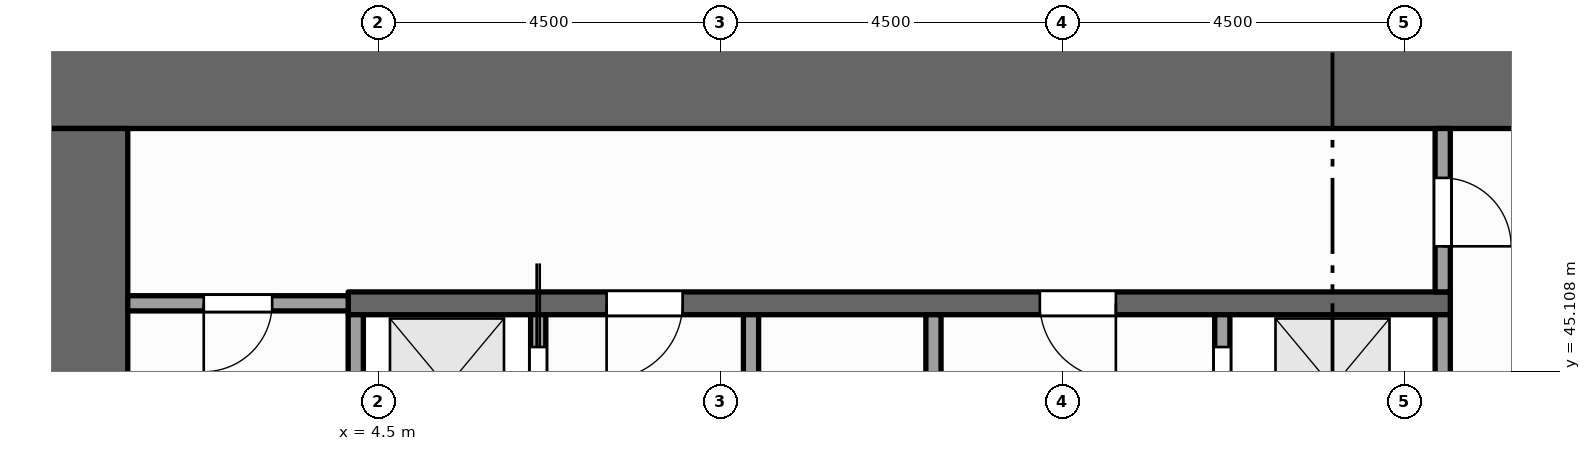
"""IFC4 building model, lengths in metres.
Left out: names, types, materials, properties, quantities, classifications, styles, units other than length and angle.
Written with IfcOpenShell. Run it as: python <this file> out.ifc"""

import sys

from ifc_helpers import new_model, si_unit, direction, frame, frame_2d, origin, place, context, subcontext, project, spatial, rectangle, extrude, element, fill, save


model = new_model("IFC4")
c1 = context("Model", 3, precision=1e-05, world=origin(), true_north=direction((0.0, 1.0)))
c2 = subcontext(c1, "Body", "Model", "MODEL_VIEW")
j1 = project(units=[si_unit("LENGTHUNIT", "METRE"), si_unit("PLANEANGLEUNIT", "RADIAN")], contexts=[c1])
p1 = place(None, origin())
s1 = spatial("IfcSite", under=j1, at=p1, CompositionType="ELEMENT")
p2 = place(p1, origin())
s2 = spatial("IfcBuilding", under=s1, at=p2, CompositionType="ELEMENT")
p3 = place(p2, frame((0.0, 0.0, 8.0)))
s3 = spatial("IfcBuildingStorey", under=s2, at=p3, CompositionType="ELEMENT", Elevation=8.0)
p4 = place(p3, frame((0.0, 48.9, -0.15), z_axis=(0.0, 0.0, 1.0), x_axis=(1.0, 0.0, 0.0)))
e1 = element("IfcWall", 1, at=p4, inside=s3, PredefinedType="SHEAR", context=c2, shape_type="SweptSolid", body=[
    extrude(rectangle(XDim=22.5, YDim=1.2, at=frame_2d((11.25, 0.0))), origin(), (0.0, 0.0, 1.0), 6.0),
])
p5 = place(p3, frame((0.6, 37.2, -0.15), z_axis=(0.0, 0.0, 1.0), x_axis=(0.0, 1.0, 0.0)))
e2 = element("IfcWall", 2, at=p5, inside=s3, PredefinedType="SHEAR", context=c2, shape_type="SweptSolid", body=[
    extrude(rectangle(XDim=11.1, YDim=1.2, at=frame_2d((5.55, 0.0))), origin(), (0.0, 0.0, 1.0), 6.0),
])
p6 = place(p3, frame((4.2, 43.525, 0.0), z_axis=(0.0, 0.0, 1.0), x_axis=(0.0, 1.0, 0.0)))
e3 = element("IfcWall", 3, at=p6, inside=s3, PredefinedType="SOLIDWALL", context=c2, shape_type="SweptSolid", body=[
    extrude(rectangle(XDim=2.325, YDim=0.2, at=frame_2d((1.163, 0.0))), origin(), (0.0, 0.0, 1.0), 5.75),
])
p7 = place(p3, frame((6.6, 37.2, 0.0), z_axis=(0.0, 0.0, 1.0), x_axis=(0.0, 1.0, 0.0)))
e4 = element("IfcWall", 4, at=p7, inside=s3, PredefinedType="SOLIDWALL", context=c2, shape_type="SweptSolid", body=[
    extrude(rectangle(XDim=8.65, YDim=0.2, at=frame_2d((4.325, 0.0))), origin(), (0.0, 0.0, 1.0), 5.75),
])
p8 = place(p7, frame((0.5, 0.0, 0.012)))
e5 = element("IfcOpeningElement", 5, at=p8, cuts=e4, PredefinedType="OPENING", context=c2, shape_type="SweptSolid", body=[
    extrude(rectangle(XDim=1.1, YDim=2.1, at=frame_2d((0.55, 1.05))), frame((0.0, 0.11, 0.0), z_axis=(0.0, -1.0, 0.0), x_axis=(1.0, 0.0, 0.0)), (0.0, 0.0, 1.0), 0.22),
])
p9 = place(p7, frame((2.75, 0.0, 0.012)))
e6 = element("IfcOpeningElement", 6, at=p9, cuts=e4, PredefinedType="OPENING", context=c2, shape_type="SweptSolid", body=[
    extrude(rectangle(XDim=1.1, YDim=2.1, at=frame_2d((0.55, 1.05))), frame((0.0, 0.11, 0.0), z_axis=(0.0, -1.0, 0.0), x_axis=(1.0, 0.0, 0.0)), (0.0, 0.0, 1.0), 0.22),
])
p10 = place(p7, frame((4.95, 0.0, 0.012)))
e7 = element("IfcOpeningElement", 7, at=p10, cuts=e4, PredefinedType="OPENING", context=c2, shape_type="SweptSolid", body=[
    extrude(rectangle(XDim=1.1, YDim=2.1, at=frame_2d((0.55, 1.05))), frame((0.0, 0.11, 0.0), z_axis=(0.0, -1.0, 0.0), x_axis=(1.0, 0.0, 0.0)), (0.0, 0.0, 1.0), 0.22),
])
p11 = place(p7, frame((7.125, 0.0, 0.012)))
e8 = element("IfcOpeningElement", 8, at=p11, cuts=e4, PredefinedType="OPENING", context=c2, shape_type="SweptSolid", body=[
    extrude(rectangle(XDim=1.1, YDim=2.1, at=frame_2d((0.55, 1.05))), frame((0.0, 0.11, 0.0), z_axis=(0.0, -1.0, 0.0), x_axis=(1.0, 0.0, 0.0)), (0.0, 0.0, 1.0), 0.22),
])
p12 = place(p3, frame((9.4, 37.2, 0.0), z_axis=(0.0, 0.0, 1.0), x_axis=(0.0, 1.0, 0.0)))
e9 = element("IfcWall", 9, at=p12, inside=s3, PredefinedType="PARTITIONING", context=c2, shape_type="SweptSolid", body=[
    extrude(rectangle(XDim=8.65, YDim=0.2, at=frame_2d((4.325, 0.0))), origin(), (0.0, 0.0, 1.0), 5.75),
])
p13 = place(p12, frame((3.875, 0.0, 0.0)))
e10 = element("IfcOpeningElement", 10, at=p13, cuts=e9, PredefinedType="OPENING", context=c2, shape_type="SweptSolid", body=[
    extrude(rectangle(XDim=0.9, YDim=2.1, at=frame_2d((0.45, 1.05))), frame((0.0, 0.11, 0.0), z_axis=(0.0, -1.0, 0.0), x_axis=(1.0, 0.0, 0.0)), (0.0, 0.0, 1.0), 0.22),
])
p14 = place(p3, frame((11.8, 37.2, 0.0), z_axis=(0.0, 0.0, 1.0), x_axis=(0.0, 1.0, 0.0)))
e11 = element("IfcWall", 11, at=p14, inside=s3, PredefinedType="PARTITIONING", context=c2, shape_type="SweptSolid", body=[
    extrude(rectangle(XDim=8.65, YDim=0.2, at=frame_2d((4.325, 0.0))), origin(), (0.0, 0.0, 1.0), 5.75),
])
p15 = place(p3, frame((15.6, 43.7, 0.0), z_axis=(0.0, 0.0, 1.0), x_axis=(0.0, 1.0, 0.0)))
e12 = element("IfcWall", 12, at=p15, inside=s3, PredefinedType="SOLIDWALL", context=c2, shape_type="SweptSolid", body=[
    extrude(rectangle(XDim=2.15, YDim=0.2, at=frame_2d((1.075, 0.0))), origin(), (0.0, 0.0, 1.0), 5.75),
])
p16 = place(p15, frame((0.625, 0.0, 0.012)))
e13 = element("IfcOpeningElement", 13, at=p16, cuts=e12, PredefinedType="OPENING", context=c2, shape_type="SweptSolid", body=[
    extrude(rectangle(XDim=1.1, YDim=2.1, at=frame_2d((0.55, 1.05))), frame((0.0, 0.11, 0.0), z_axis=(0.0, -1.0, 0.0), x_axis=(1.0, 0.0, 0.0)), (0.0, 0.0, 1.0), 0.22),
])
p17 = place(p3, frame((18.5, 43.7, 0.0), z_axis=(0.0, 0.0, 1.0), x_axis=(0.0, 1.0, 0.0)))
e14 = element("IfcWall", 14, at=p17, inside=s3, PredefinedType="SOLIDWALL", context=c2, shape_type="SweptSolid", body=[
    extrude(rectangle(XDim=2.15, YDim=0.2, at=frame_2d((1.075, 0.0))), origin(), (0.0, 0.0, 1.0), 5.75),
])
p18 = place(p3, frame((18.5, 46.15, 0.0), z_axis=(0.0, 0.0, 1.0), x_axis=(0.0, 1.0, 0.0)))
e15 = element("IfcWall", 15, at=p18, inside=s3, PredefinedType="PARTITIONING", context=c2, shape_type="SweptSolid", body=[
    extrude(rectangle(XDim=2.15, YDim=0.2, at=frame_2d((1.075, 0.0))), origin(), (0.0, 0.0, 1.0), 5.75),
])
p19 = place(p18, frame((0.6, 0.0, 0.0)))
e16 = element("IfcOpeningElement", 16, at=p19, cuts=e15, PredefinedType="OPENING", context=c2, shape_type="SweptSolid", body=[
    extrude(rectangle(XDim=0.9, YDim=2.1, at=frame_2d((0.45, 1.05))), frame((0.0, 0.11, 0.0), z_axis=(0.0, -1.0, 0.0), x_axis=(1.0, 0.0, 0.0)), (0.0, 0.0, 1.0), 0.22),
])
p20 = place(p3, frame((1.2, 46.0, 0.0), z_axis=(0.0, 0.0, 1.0), x_axis=(1.0, 0.0, 0.0)))
e17 = element("IfcWall", 17, at=p20, inside=s3, PredefinedType="PARTITIONING", context=c2, shape_type="SweptSolid", body=[
    extrude(rectangle(XDim=2.9, YDim=0.2, at=frame_2d((1.45, 0.0))), origin(), (0.0, 0.0, 1.0), 5.75),
])
p21 = place(p20, frame((1.0, 0.0, 0.0)))
e18 = element("IfcOpeningElement", 18, at=p21, cuts=e17, PredefinedType="OPENING", context=c2, shape_type="SweptSolid", body=[
    extrude(rectangle(XDim=0.9, YDim=2.1, at=frame_2d((0.45, 1.05))), frame((0.0, 0.11, 0.0), z_axis=(0.0, -1.0, 0.0), x_axis=(1.0, 0.0, 0.0)), (0.0, 0.0, 1.0), 0.22),
])
p22 = place(p3, frame((4.1, 46.0, 0.0), z_axis=(0.0, 0.0, 1.0), x_axis=(1.0, 0.0, 0.0)))
e19 = element("IfcWall", 19, at=p22, inside=s3, PredefinedType="SHEAR", context=c2, shape_type="SweptSolid", body=[
    extrude(rectangle(XDim=14.5, YDim=0.3, at=frame_2d((7.25, 0.0))), origin(), (0.0, 0.0, 1.0), 5.75),
])
p23 = place(p22, frame((3.4, 0.0, 0.0)))
e20 = element("IfcOpeningElement", 20, at=p23, cuts=e19, PredefinedType="OPENING", context=c2, shape_type="SweptSolid", body=[
    extrude(rectangle(XDim=1.0, YDim=2.1, at=frame_2d((0.5, 1.05))), frame((0.0, 0.16, 0.0), z_axis=(0.0, -1.0, 0.0), x_axis=(1.0, 0.0, 0.0)), (0.0, 0.0, 1.0), 0.32),
])
p24 = place(p22, frame((9.1, 0.0, 0.0)))
e21 = element("IfcOpeningElement", 21, at=p24, cuts=e19, PredefinedType="OPENING", context=c2, shape_type="SweptSolid", body=[
    extrude(rectangle(XDim=1.0, YDim=2.1, at=frame_2d((0.5, 1.05))), frame((0.0, 0.16, 0.0), z_axis=(0.0, -1.0, 0.0), x_axis=(1.0, 0.0, 0.0)), (0.0, 0.0, 1.0), 0.32),
])
p25 = place(p11, origin())
e22 = element("IfcDoor", 22, at=p25, inside=s3, OperationType="SLIDING_TO_RIGHT", PredefinedType="DOOR", context=c2, shape_type="SweptSolid", body=[
    extrude(rectangle(XDim=1.1, YDim=2.1, at=frame_2d((0.55, 1.05))), frame((0.0, 0.025, 0.0), z_axis=(0.0, -1.0, 0.0), x_axis=(1.0, 0.0, 0.0)), (0.0, 0.0, 1.0), 0.05),
])
fill(e8, e22)
p26 = place(p16, origin())
e23 = element("IfcDoor", 23, at=p26, inside=s3, OperationType="SLIDING_TO_LEFT", PredefinedType="DOOR", context=c2, shape_type="SweptSolid", body=[
    extrude(rectangle(XDim=1.1, YDim=2.1, at=frame_2d((0.55, 1.05))), frame((0.0, 0.025, 0.0), z_axis=(0.0, -1.0, 0.0), x_axis=(1.0, 0.0, 0.0)), (0.0, 0.0, 1.0), 0.05),
])
fill(e13, e23)
p27 = place(p23, origin())
e24 = element("IfcDoor", 24, at=p27, inside=s3, OperationType="SINGLE_SWING_LEFT", PredefinedType="DOOR", context=c2, shape_type="SweptSolid", body=[
    extrude(rectangle(XDim=1.0, YDim=2.1, at=frame_2d((0.5, 1.05))), frame((0.0, 0.025, 0.0), z_axis=(0.0, -1.0, 0.0), x_axis=(1.0, 0.0, 0.0)), (0.0, 0.0, 1.0), 0.05),
])
fill(e20, e24)
p28 = place(p24, origin())
e25 = element("IfcDoor", 25, at=p28, inside=s3, OperationType="SINGLE_SWING_RIGHT", PredefinedType="DOOR", context=c2, shape_type="SweptSolid", body=[
    extrude(rectangle(XDim=1.0, YDim=2.1, at=frame_2d((0.5, 1.05))), frame((0.0, 0.025, 0.0), z_axis=(0.0, -1.0, 0.0), x_axis=(1.0, 0.0, 0.0)), (0.0, 0.0, 1.0), 0.05),
])
fill(e21, e25)
p29 = place(p21, origin())
e26 = element("IfcDoor", 26, at=p29, inside=s3, OperationType="SINGLE_SWING_LEFT", PredefinedType="DOOR", context=c2, shape_type="SweptSolid", body=[
    extrude(rectangle(XDim=0.9, YDim=2.1, at=frame_2d((0.45, 1.05))), frame((0.0, 0.025, 0.0), z_axis=(0.0, -1.0, 0.0), x_axis=(1.0, 0.0, 0.0)), (0.0, 0.0, 1.0), 0.05),
])
fill(e18, e26)
p30 = place(p19, origin())
e27 = element("IfcDoor", 27, at=p30, inside=s3, OperationType="SINGLE_SWING_LEFT", PredefinedType="DOOR", context=c2, shape_type="SweptSolid", body=[
    extrude(rectangle(XDim=0.9, YDim=2.1, at=frame_2d((0.45, 1.05))), frame((0.0, 0.025, 0.0), z_axis=(0.0, -1.0, 0.0), x_axis=(1.0, 0.0, 0.0)), (0.0, 0.0, 1.0), 0.05),
])
fill(e16, e27)
save(model, sys.argv[1])
